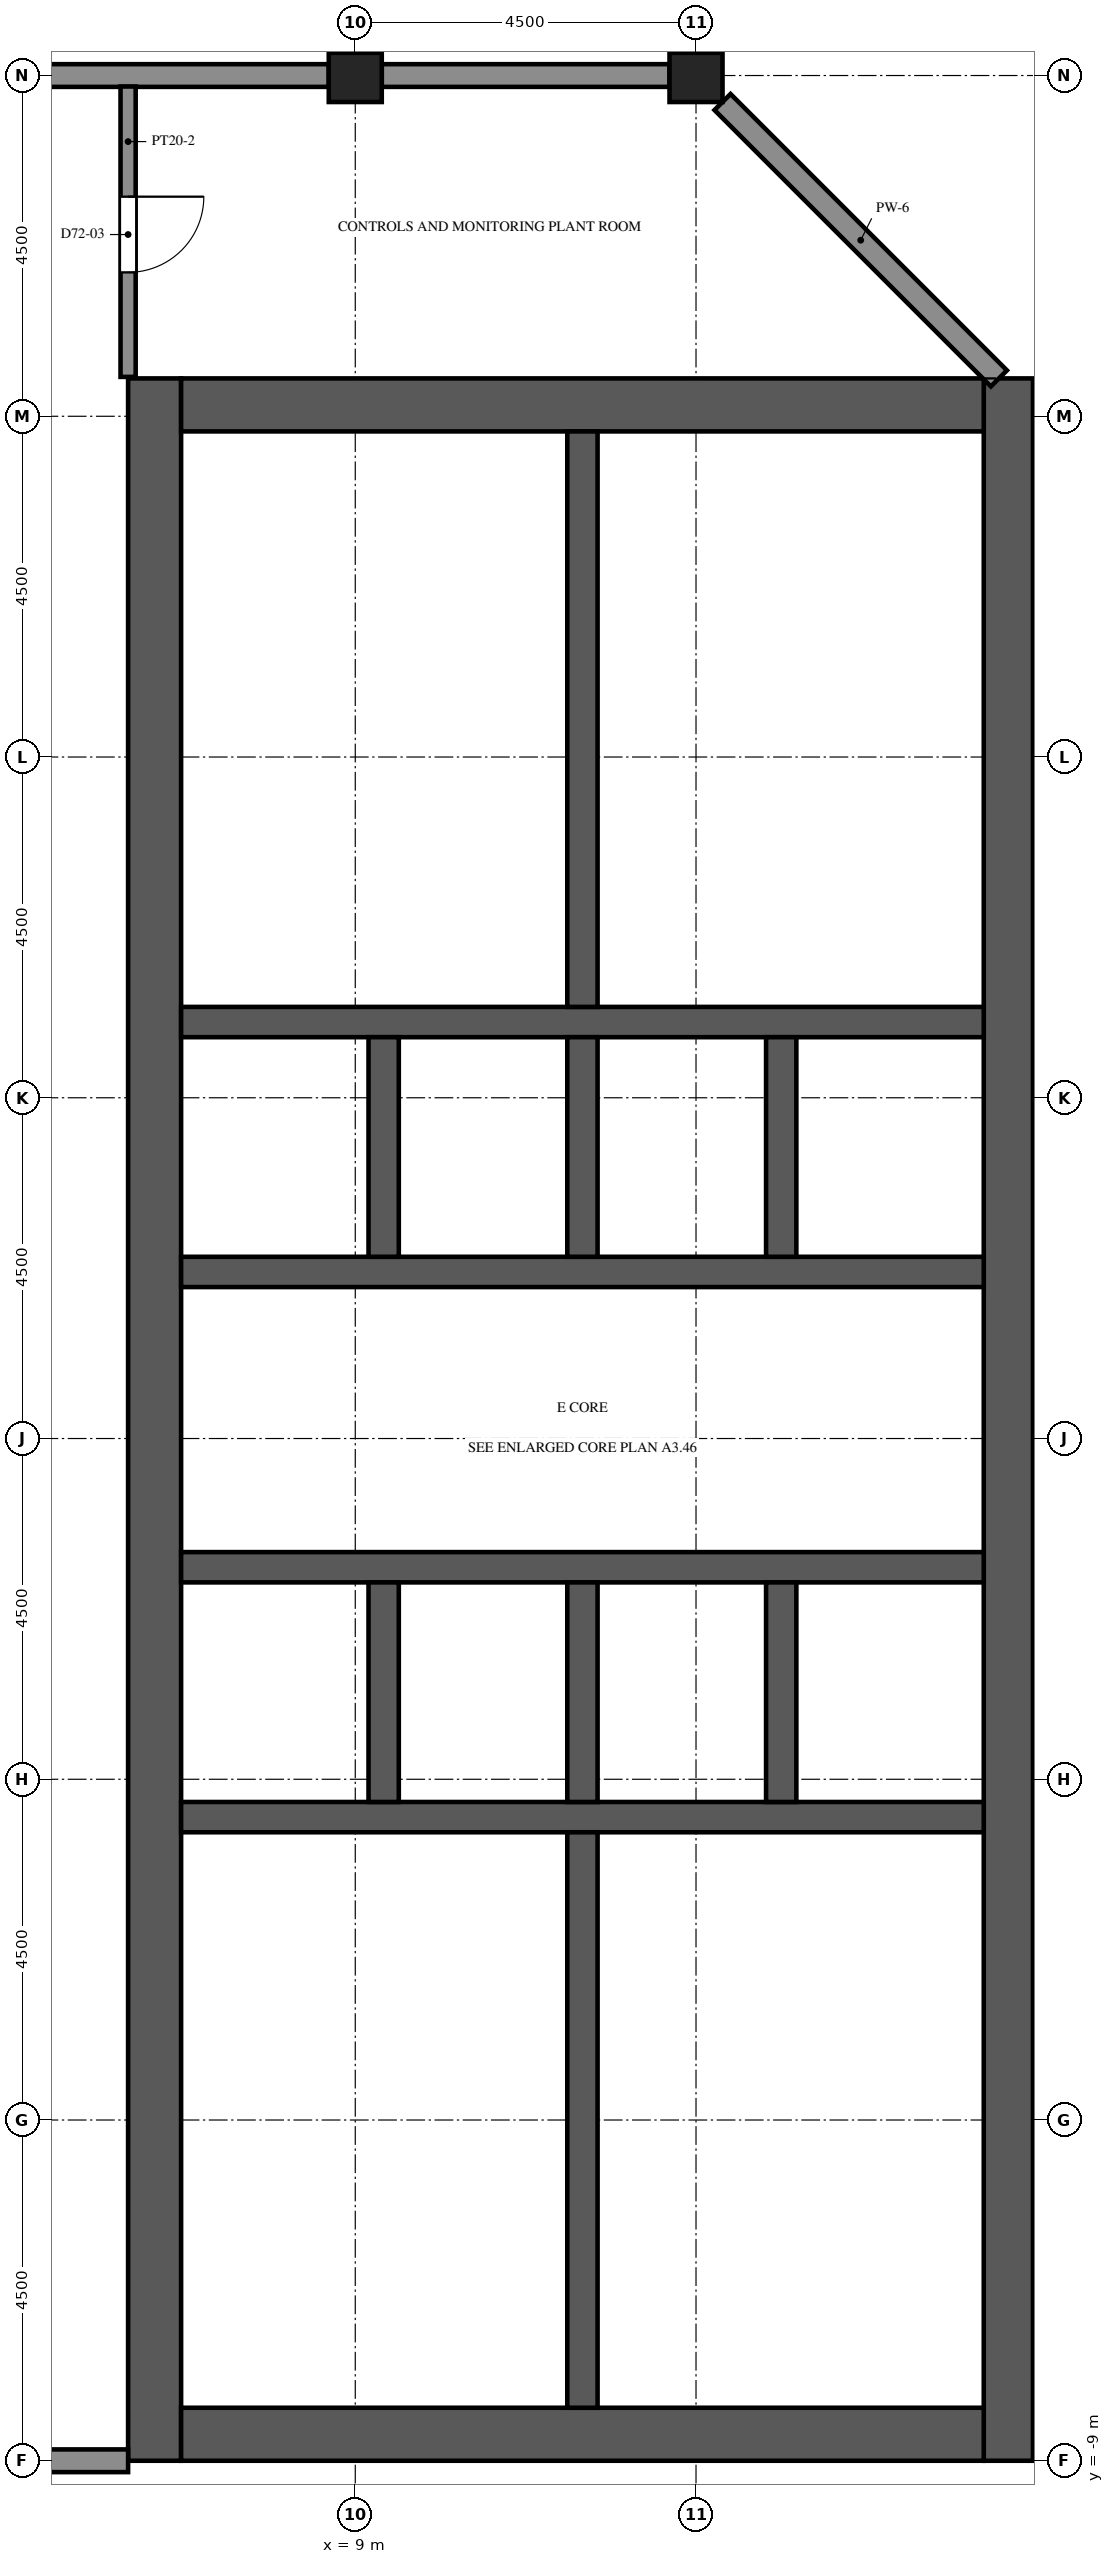
"""IFC4 building model, lengths in metres.
Left out: names, types, materials, properties, quantities, classifications, styles, units other than length and angle.
Written with IfcOpenShell. Run it as: python <this file> out.ifc"""

import sys

from ifc_helpers import new_model, si_unit, direction, frame, frame_2d, origin, origin_2d, place, context, subcontext, project, spatial, rectangle, extrude, element, fill, save


model = new_model("IFC4")
c1 = context("Model", 3, precision=1e-05, world=origin(), true_north=direction((0.0, 1.0)))
c2 = subcontext(c1, "Body", "Model", "MODEL_VIEW")
j1 = project(units=[si_unit("LENGTHUNIT", "METRE"), si_unit("PLANEANGLEUNIT", "RADIAN")], contexts=[c1])
p1 = place(None, origin())
s1 = spatial("IfcSite", under=j1, at=p1, CompositionType="ELEMENT")
p2 = place(p1, origin())
s2 = spatial("IfcBuilding", under=s1, at=p2, CompositionType="ELEMENT")
p3 = place(p2, frame((0.0, 0.0, 321.4)))
s3 = spatial("IfcBuildingStorey", under=s2, at=p3, CompositionType="ELEMENT", Elevation=321.4)
for number, where, z_axis, x_axis in (
    (1, (9.0, 22.5, 0.0), (0.0, 0.0, 1.0), (1.0, 0.0, 0.0)),
    (2, (13.5, 22.5, 0.0), (0.0, 0.0, 1.0), (1.0, 0.0, 0.0)),
):
    element("IfcColumn", number, at=place(p3, frame(where, z_axis=z_axis, x_axis=x_axis)), inside=s3, PredefinedType="COLUMN", context=c2, shape_type="SweptSolid", body=[
        extrude(rectangle(XDim=0.7, YDim=0.7, at=origin_2d()), origin(), (0.0, 0.0, 1.0), 4.8),
    ])
p4 = place(p3, frame((6.35, -9.0, 0.0), z_axis=(0.0, 0.0, 1.0), x_axis=(0.0, 1.0, 0.0)))
e3 = element("IfcWall", 3, at=p4, inside=s3, PredefinedType="SHEAR", context=c2, shape_type="SweptSolid", body=[
    extrude(rectangle(XDim=27.5, YDim=0.7, at=frame_2d((13.75, 0.0))), origin(), (0.0, 0.0, 1.0), 4.8),
])
p5 = place(p4, frame((12.55, 0.0, 0.0)))
e4 = element("IfcOpeningElement", 4, at=p5, cuts=e3, PredefinedType="OPENING", context=c2, shape_type="SweptSolid", body=[
    extrude(rectangle(XDim=2.4, YDim=2.4, at=frame_2d((1.2, 1.2))), frame((0.0, 0.36, 0.0), z_axis=(0.0, -1.0, 0.0), x_axis=(1.0, 0.0, 0.0)), (0.0, 0.0, 1.0), 0.72),
])
p6 = place(p4, frame((3.9, 0.0, 0.0)))
e5 = element("IfcOpeningElement", 5, at=p6, cuts=e3, PredefinedType="OPENING", context=c2, shape_type="SweptSolid", body=[
    extrude(rectangle(XDim=1.2, YDim=2.1, at=frame_2d((0.6, 1.05))), frame((0.0, 0.36, 0.0), z_axis=(0.0, -1.0, 0.0), x_axis=(1.0, 0.0, 0.0)), (0.0, 0.0, 1.0), 0.72),
])
p7 = place(p4, frame((22.4, 0.0, 0.0)))
e6 = element("IfcOpeningElement", 6, at=p7, cuts=e3, PredefinedType="OPENING", context=c2, shape_type="SweptSolid", body=[
    extrude(rectangle(XDim=1.2, YDim=2.1, at=frame_2d((0.6, 1.05))), frame((0.0, 0.36, 0.0), z_axis=(0.0, -1.0, 0.0), x_axis=(1.0, 0.0, 0.0)), (0.0, 0.0, 1.0), 0.72),
])
p8 = place(p3, frame((17.65, -9.0, 0.0), z_axis=(0.0, 0.0, 1.0), x_axis=(0.0, 1.0, 0.0)))
e7 = element("IfcWall", 7, at=p8, inside=s3, PredefinedType="SHEAR", context=c2, shape_type="SweptSolid", body=[
    extrude(rectangle(XDim=27.5, YDim=0.7, at=frame_2d((13.75, 0.0))), origin(), (0.0, 0.0, 1.0), 4.8),
])
for number, where, z_axis, x_axis in (
    (8, (6.7, -8.65, 0.0), (0.0, 0.0, 1.0), (1.0, 0.0, 0.0)),
    (9, (6.7, 18.15, 0.0), (0.0, 0.0, 1.0), (1.0, 0.0, 0.0)),
):
    element("IfcWall", number, at=place(p3, frame(where, z_axis=z_axis, x_axis=x_axis)), inside=s3, PredefinedType="SHEAR", context=c2, shape_type="SweptSolid", body=[
        extrude(rectangle(XDim=10.6, YDim=0.7, at=frame_2d((5.3, 0.0))), origin(), (0.0, 0.0, 1.0), 4.8),
    ])
p9 = place(p3, frame((6.7, -0.5, 0.0), z_axis=(0.0, 0.0, 1.0), x_axis=(1.0, 0.0, 0.0)))
e10 = element("IfcWall", 10, at=p9, inside=s3, PredefinedType="SHEAR", context=c2, shape_type="SweptSolid", body=[
    extrude(rectangle(XDim=10.6, YDim=0.4, at=frame_2d((5.3, 0.0))), origin(), (0.0, 0.0, 1.0), 4.8),
])
p10 = place(p3, frame((6.7, 2.8, 0.0), z_axis=(0.0, 0.0, 1.0), x_axis=(1.0, 0.0, 0.0)))
e11 = element("IfcWall", 11, at=p10, inside=s3, PredefinedType="SHEAR", context=c2, shape_type="SweptSolid", body=[
    extrude(rectangle(XDim=10.6, YDim=0.4, at=frame_2d((5.3, 0.0))), origin(), (0.0, 0.0, 1.0), 4.8),
])
p11 = place(p10, frame((0.688, 0.0, 0.0)))
e12 = element("IfcOpeningElement", 12, at=p11, cuts=e11, PredefinedType="OPENING", context=c2, shape_type="SweptSolid", body=[
    extrude(rectangle(XDim=1.1, YDim=2.1, at=frame_2d((0.55, 1.05))), frame((0.0, 0.21, 0.0), z_axis=(0.0, -1.0, 0.0), x_axis=(1.0, 0.0, 0.0)), (0.0, 0.0, 1.0), 0.42),
])
p12 = place(p10, frame((3.438, 0.0, 0.0)))
e13 = element("IfcOpeningElement", 13, at=p12, cuts=e11, PredefinedType="OPENING", context=c2, shape_type="SweptSolid", body=[
    extrude(rectangle(XDim=1.1, YDim=2.1, at=frame_2d((0.55, 1.05))), frame((0.0, 0.21, 0.0), z_axis=(0.0, -1.0, 0.0), x_axis=(1.0, 0.0, 0.0)), (0.0, 0.0, 1.0), 0.42),
])
p13 = place(p10, frame((6.113, 0.0, 0.0)))
e14 = element("IfcOpeningElement", 14, at=p13, cuts=e11, PredefinedType="OPENING", context=c2, shape_type="SweptSolid", body=[
    extrude(rectangle(XDim=1.0, YDim=2.1, at=frame_2d((0.5, 1.05))), frame((0.0, 0.21, 0.0), z_axis=(0.0, -1.0, 0.0), x_axis=(1.0, 0.0, 0.0)), (0.0, 0.0, 1.0), 0.42),
])
p14 = place(p10, frame((8.863, 0.0, 0.0)))
e15 = element("IfcOpeningElement", 15, at=p14, cuts=e11, PredefinedType="OPENING", context=c2, shape_type="SweptSolid", body=[
    extrude(rectangle(XDim=1.0, YDim=2.1, at=frame_2d((0.5, 1.05))), frame((0.0, 0.21, 0.0), z_axis=(0.0, -1.0, 0.0), x_axis=(1.0, 0.0, 0.0)), (0.0, 0.0, 1.0), 0.42),
])
p15 = place(p3, frame((6.7, 6.7, 0.0), z_axis=(0.0, 0.0, 1.0), x_axis=(1.0, 0.0, 0.0)))
e16 = element("IfcWall", 16, at=p15, inside=s3, PredefinedType="SHEAR", context=c2, shape_type="SweptSolid", body=[
    extrude(rectangle(XDim=10.6, YDim=0.4, at=frame_2d((5.3, 0.0))), origin(), (0.0, 0.0, 1.0), 4.8),
])
p16 = place(p15, frame((0.738, 0.0, 0.0)))
e17 = element("IfcOpeningElement", 17, at=p16, cuts=e16, PredefinedType="OPENING", context=c2, shape_type="SweptSolid", body=[
    extrude(rectangle(XDim=1.0, YDim=2.1, at=frame_2d((0.5, 1.05))), frame((0.0, 0.21, 0.0), z_axis=(0.0, -1.0, 0.0), x_axis=(1.0, 0.0, 0.0)), (0.0, 0.0, 1.0), 0.42),
])
p17 = place(p15, frame((3.488, 0.0, 0.0)))
e18 = element("IfcOpeningElement", 18, at=p17, cuts=e16, PredefinedType="OPENING", context=c2, shape_type="SweptSolid", body=[
    extrude(rectangle(XDim=1.0, YDim=2.1, at=frame_2d((0.5, 1.05))), frame((0.0, 0.21, 0.0), z_axis=(0.0, -1.0, 0.0), x_axis=(1.0, 0.0, 0.0)), (0.0, 0.0, 1.0), 0.42),
])
p18 = place(p15, frame((6.113, 0.0, 0.0)))
e19 = element("IfcOpeningElement", 19, at=p18, cuts=e16, PredefinedType="OPENING", context=c2, shape_type="SweptSolid", body=[
    extrude(rectangle(XDim=1.0, YDim=2.1, at=frame_2d((0.5, 1.05))), frame((0.0, 0.21, 0.0), z_axis=(0.0, -1.0, 0.0), x_axis=(1.0, 0.0, 0.0)), (0.0, 0.0, 1.0), 0.42),
])
p19 = place(p15, frame((8.863, 0.0, 0.0)))
e20 = element("IfcOpeningElement", 20, at=p19, cuts=e16, PredefinedType="OPENING", context=c2, shape_type="SweptSolid", body=[
    extrude(rectangle(XDim=1.0, YDim=2.1, at=frame_2d((0.5, 1.05))), frame((0.0, 0.21, 0.0), z_axis=(0.0, -1.0, 0.0), x_axis=(1.0, 0.0, 0.0)), (0.0, 0.0, 1.0), 0.42),
])
p20 = place(p3, frame((6.7, 10.0, 0.0), z_axis=(0.0, 0.0, 1.0), x_axis=(1.0, 0.0, 0.0)))
e21 = element("IfcWall", 21, at=p20, inside=s3, PredefinedType="SHEAR", context=c2, shape_type="SweptSolid", body=[
    extrude(rectangle(XDim=10.6, YDim=0.4, at=frame_2d((5.3, 0.0))), origin(), (0.0, 0.0, 1.0), 4.8),
])
for number, where, z_axis, x_axis in (
    (22, (9.375, -0.3, 0.0), (0.0, 0.0, 1.0), (0.0, 1.0, 0.0)),
    (23, (9.375, 6.9, 0.0), (0.0, 0.0, 1.0), (0.0, 1.0, 0.0)),
    (24, (12.0, -0.3, 0.0), (0.0, 0.0, 1.0), (0.0, 1.0, 0.0)),
    (25, (12.0, 6.9, 0.0), (0.0, 0.0, 1.0), (0.0, 1.0, 0.0)),
    (26, (14.625, -0.3, 0.0), (0.0, 0.0, 1.0), (0.0, 1.0, 0.0)),
    (27, (14.625, 6.9, 0.0), (0.0, 0.0, 1.0), (0.0, 1.0, 0.0)),
):
    element("IfcWall", number, at=place(p3, frame(where, z_axis=z_axis, x_axis=x_axis)), inside=s3, PredefinedType="SHEAR", context=c2, shape_type="SweptSolid", body=[
        extrude(rectangle(XDim=2.9, YDim=0.4, at=frame_2d((1.45, 0.0))), origin(), (0.0, 0.0, 1.0), 4.8),
    ])
p21 = place(p3, frame((12.0, -8.3, 0.0), z_axis=(0.0, 0.0, 1.0), x_axis=(0.0, 1.0, 0.0)))
e28 = element("IfcWall", 28, at=p21, inside=s3, PredefinedType="SHEAR", context=c2, shape_type="SweptSolid", body=[
    extrude(rectangle(XDim=7.6, YDim=0.4, at=frame_2d((3.8, 0.0))), origin(), (0.0, 0.0, 1.0), 4.8),
])
p22 = place(p21, frame((6.125, 0.0, 0.0)))
e29 = element("IfcOpeningElement", 29, at=p22, cuts=e28, PredefinedType="OPENING", context=c2, shape_type="SweptSolid", body=[
    extrude(rectangle(XDim=1.2, YDim=2.1, at=frame_2d((0.6, 1.05))), frame((0.0, 0.21, 0.0), z_axis=(0.0, -1.0, 0.0), x_axis=(1.0, 0.0, 0.0)), (0.0, 0.0, 1.0), 0.42),
])
p23 = place(p3, frame((12.0, 10.2, 0.0), z_axis=(0.0, 0.0, 1.0), x_axis=(0.0, 1.0, 0.0)))
e30 = element("IfcWall", 30, at=p23, inside=s3, PredefinedType="SHEAR", context=c2, shape_type="SweptSolid", body=[
    extrude(rectangle(XDim=7.6, YDim=0.4, at=frame_2d((3.8, 0.0))), origin(), (0.0, 0.0, 1.0), 4.8),
])
p24 = place(p23, frame((0.275, 0.0, 0.0)))
e31 = element("IfcOpeningElement", 31, at=p24, cuts=e30, PredefinedType="OPENING", context=c2, shape_type="SweptSolid", body=[
    extrude(rectangle(XDim=1.2, YDim=2.1, at=frame_2d((0.6, 1.05))), frame((0.0, 0.21, 0.0), z_axis=(0.0, -1.0, 0.0), x_axis=(1.0, 0.0, 0.0)), (0.0, 0.0, 1.0), 0.42),
])
p25 = place(p3, frame((4.85, -9.0, 0.0), z_axis=(0.0, 0.0, 1.0), x_axis=(1.0, 0.0, 0.0)))
e32 = element("IfcWall", 32, at=p25, inside=s3, PredefinedType="SOLIDWALL", context=c2, shape_type="SweptSolid", body=[
    extrude(rectangle(XDim=1.15, YDim=0.3, at=frame_2d((0.575, 0.0))), origin(), (0.0, 0.0, 1.0), 0.85),
])
p26 = place(p3, frame((17.5, 18.5, 0.0), z_axis=(0.0, 0.0, 1.0), x_axis=(-0.707106781187, 0.707106781187, 0.0)))
e33 = element("IfcWall", 33, at=p26, inside=s3, PredefinedType="SOLIDWALL", context=c2, shape_type="SweptSolid", body=[
    extrude(rectangle(XDim=5.162, YDim=0.3, at=frame_2d((2.581, 0.0))), origin(), (0.0, 0.0, 1.0), 3.5),
])
for number, where, z_axis, x_axis in (
    (34, (13.15, 22.5, 0.0), (0.0, 0.0, 1.0), (-1.0, 0.0, 0.0)),
    (35, (8.65, 22.5, 0.0), (0.0, 0.0, 1.0), (-1.0, 0.0, 0.0)),
):
    element("IfcWall", number, at=place(p3, frame(where, z_axis=z_axis, x_axis=x_axis)), inside=s3, PredefinedType="SOLIDWALL", context=c2, shape_type="SweptSolid", body=[
        extrude(rectangle(XDim=3.8, YDim=0.3, at=frame_2d((1.9, 0.0))), origin(), (0.0, 0.0, 1.0), 0.85),
    ])
p27 = place(p3, frame((6.0, 22.355, 0.0), z_axis=(0.0, 0.0, 1.0), x_axis=(0.0, -1.0, 0.0)))
e36 = element("IfcWall", 36, at=p27, inside=s3, PredefinedType="PARTITIONING", context=c2, shape_type="SweptSolid", body=[
    extrude(rectangle(XDim=3.835, YDim=0.2, at=frame_2d((1.917, 0.0))), origin(), (0.0, 0.0, 1.0), 4.2),
])
p28 = place(p27, frame((1.455, 0.0, 0.0)))
e37 = element("IfcOpeningElement", 37, at=p28, cuts=e36, PredefinedType="OPENING", context=c2, shape_type="SweptSolid", body=[
    extrude(rectangle(XDim=1.0, YDim=2.1, at=frame_2d((0.5, 1.05))), frame((0.0, 0.11, 0.0), z_axis=(0.0, -1.0, 0.0), x_axis=(1.0, 0.0, 0.0)), (0.0, 0.0, 1.0), 0.22),
])
p29 = place(p28, origin())
e38 = element("IfcDoor", 38, at=p29, inside=s3, OperationType="SINGLE_SWING_LEFT", PredefinedType="DOOR", context=c2, shape_type="SweptSolid", body=[
    extrude(rectangle(XDim=1.0, YDim=2.1, at=frame_2d((0.5, 1.05))), frame((0.0, 0.025, 0.0), z_axis=(0.0, -1.0, 0.0), x_axis=(1.0, 0.0, 0.0)), (0.0, 0.0, 1.0), 0.05),
])
fill(e37, e38)
p30 = place(p11, origin())
e39 = element("IfcDoor", 39, at=p30, inside=s3, OperationType="DOUBLE_DOOR_SLIDING", PredefinedType="DOOR", context=c2, shape_type="SweptSolid", body=[
    extrude(rectangle(XDim=1.1, YDim=2.1, at=frame_2d((0.55, 1.05))), frame((0.0, 0.025, 0.0), z_axis=(0.0, -1.0, 0.0), x_axis=(1.0, 0.0, 0.0)), (0.0, 0.0, 1.0), 0.05),
])
fill(e12, e39)
p31 = place(p12, origin())
e40 = element("IfcDoor", 40, at=p31, inside=s3, OperationType="DOUBLE_DOOR_SLIDING", PredefinedType="DOOR", context=c2, shape_type="SweptSolid", body=[
    extrude(rectangle(XDim=1.1, YDim=2.1, at=frame_2d((0.55, 1.05))), frame((0.0, 0.025, 0.0), z_axis=(0.0, -1.0, 0.0), x_axis=(1.0, 0.0, 0.0)), (0.0, 0.0, 1.0), 0.05),
])
fill(e13, e40)
p32 = place(p5, origin())
e41 = element("IfcDoor", 41, at=p32, inside=s3, OperationType="DOUBLE_DOOR_DOUBLE_SWING", PredefinedType="DOOR", context=c2, shape_type="SweptSolid", body=[
    extrude(rectangle(XDim=2.4, YDim=2.4, at=frame_2d((1.2, 1.2))), frame((0.0, 0.025, 0.0), z_axis=(0.0, -1.0, 0.0), x_axis=(1.0, 0.0, 0.0)), (0.0, 0.0, 1.0), 0.05),
])
fill(e4, e41)
p33 = place(p22, origin())
e42 = element("IfcDoor", 42, at=p33, inside=s3, OperationType="SINGLE_SWING_RIGHT", PredefinedType="DOOR", context=c2, shape_type="SweptSolid", body=[
    extrude(rectangle(XDim=1.2, YDim=2.1, at=frame_2d((0.6, 1.05))), frame((0.0, 0.025, 0.0), z_axis=(0.0, -1.0, 0.0), x_axis=(1.0, 0.0, 0.0)), (0.0, 0.0, 1.0), 0.05),
])
fill(e29, e42)
p34 = place(p24, origin())
e43 = element("IfcDoor", 43, at=p34, inside=s3, OperationType="SINGLE_SWING_RIGHT", PredefinedType="DOOR", context=c2, shape_type="SweptSolid", body=[
    extrude(rectangle(XDim=1.2, YDim=2.1, at=frame_2d((0.6, 1.05))), frame((0.0, 0.025, 0.0), z_axis=(0.0, -1.0, 0.0), x_axis=(1.0, 0.0, 0.0)), (0.0, 0.0, 1.0), 0.05),
])
fill(e31, e43)
p35 = place(p13, origin())
e44 = element("IfcDoor", 44, at=p35, inside=s3, OperationType="SINGLE_SWING_LEFT", PredefinedType="DOOR", context=c2, shape_type="SweptSolid", body=[
    extrude(rectangle(XDim=1.0, YDim=2.1, at=frame_2d((0.5, 1.05))), frame((0.0, 0.025, 0.0), z_axis=(0.0, -1.0, 0.0), x_axis=(1.0, 0.0, 0.0)), (0.0, 0.0, 1.0), 0.05),
])
fill(e14, e44)
p36 = place(p14, origin())
e45 = element("IfcDoor", 45, at=p36, inside=s3, OperationType="SINGLE_SWING_RIGHT", PredefinedType="DOOR", context=c2, shape_type="SweptSolid", body=[
    extrude(rectangle(XDim=1.0, YDim=2.1, at=frame_2d((0.5, 1.05))), frame((0.0, 0.025, 0.0), z_axis=(0.0, -1.0, 0.0), x_axis=(1.0, 0.0, 0.0)), (0.0, 0.0, 1.0), 0.05),
])
fill(e15, e45)
p37 = place(p16, origin())
e46 = element("IfcDoor", 46, at=p37, inside=s3, OperationType="SINGLE_SWING_LEFT", PredefinedType="DOOR", context=c2, shape_type="SweptSolid", body=[
    extrude(rectangle(XDim=1.0, YDim=2.1, at=frame_2d((0.5, 1.05))), frame((0.0, 0.025, 0.0), z_axis=(0.0, -1.0, 0.0), x_axis=(1.0, 0.0, 0.0)), (0.0, 0.0, 1.0), 0.05),
])
fill(e17, e46)
p38 = place(p17, origin())
e47 = element("IfcDoor", 47, at=p38, inside=s3, OperationType="SINGLE_SWING_RIGHT", PredefinedType="DOOR", context=c2, shape_type="SweptSolid", body=[
    extrude(rectangle(XDim=1.0, YDim=2.1, at=frame_2d((0.5, 1.05))), frame((0.0, 0.025, 0.0), z_axis=(0.0, -1.0, 0.0), x_axis=(1.0, 0.0, 0.0)), (0.0, 0.0, 1.0), 0.05),
])
fill(e18, e47)
p39 = place(p18, origin())
e48 = element("IfcDoor", 48, at=p39, inside=s3, OperationType="SINGLE_SWING_LEFT", PredefinedType="DOOR", context=c2, shape_type="SweptSolid", body=[
    extrude(rectangle(XDim=1.0, YDim=2.1, at=frame_2d((0.5, 1.05))), frame((0.0, 0.025, 0.0), z_axis=(0.0, -1.0, 0.0), x_axis=(1.0, 0.0, 0.0)), (0.0, 0.0, 1.0), 0.05),
])
fill(e19, e48)
p40 = place(p19, origin())
e49 = element("IfcDoor", 49, at=p40, inside=s3, OperationType="SINGLE_SWING_RIGHT", PredefinedType="DOOR", context=c2, shape_type="SweptSolid", body=[
    extrude(rectangle(XDim=1.0, YDim=2.1, at=frame_2d((0.5, 1.05))), frame((0.0, 0.025, 0.0), z_axis=(0.0, -1.0, 0.0), x_axis=(1.0, 0.0, 0.0)), (0.0, 0.0, 1.0), 0.05),
])
fill(e20, e49)
p41 = place(p6, origin())
e50 = element("IfcDoor", 50, at=p41, inside=s3, OperationType="SINGLE_SWING_RIGHT", PredefinedType="DOOR", context=c2, shape_type="SweptSolid", body=[
    extrude(rectangle(XDim=1.2, YDim=2.1, at=frame_2d((0.6, 1.05))), frame((0.0, -0.275, 0.0), z_axis=(0.0, -1.0, 0.0), x_axis=(1.0, 0.0, 0.0)), (0.0, 0.0, 1.0), 0.05),
])
fill(e5, e50)
p42 = place(p7, origin())
e51 = element("IfcDoor", 51, at=p42, inside=s3, OperationType="SINGLE_SWING_RIGHT", PredefinedType="DOOR", context=c2, shape_type="SweptSolid", body=[
    extrude(rectangle(XDim=1.2, YDim=2.1, at=frame_2d((0.6, 1.05))), frame((0.0, -0.275, 0.0), z_axis=(0.0, -1.0, 0.0), x_axis=(1.0, 0.0, 0.0)), (0.0, 0.0, 1.0), 0.05),
])
fill(e6, e51)
save(model, sys.argv[1])
